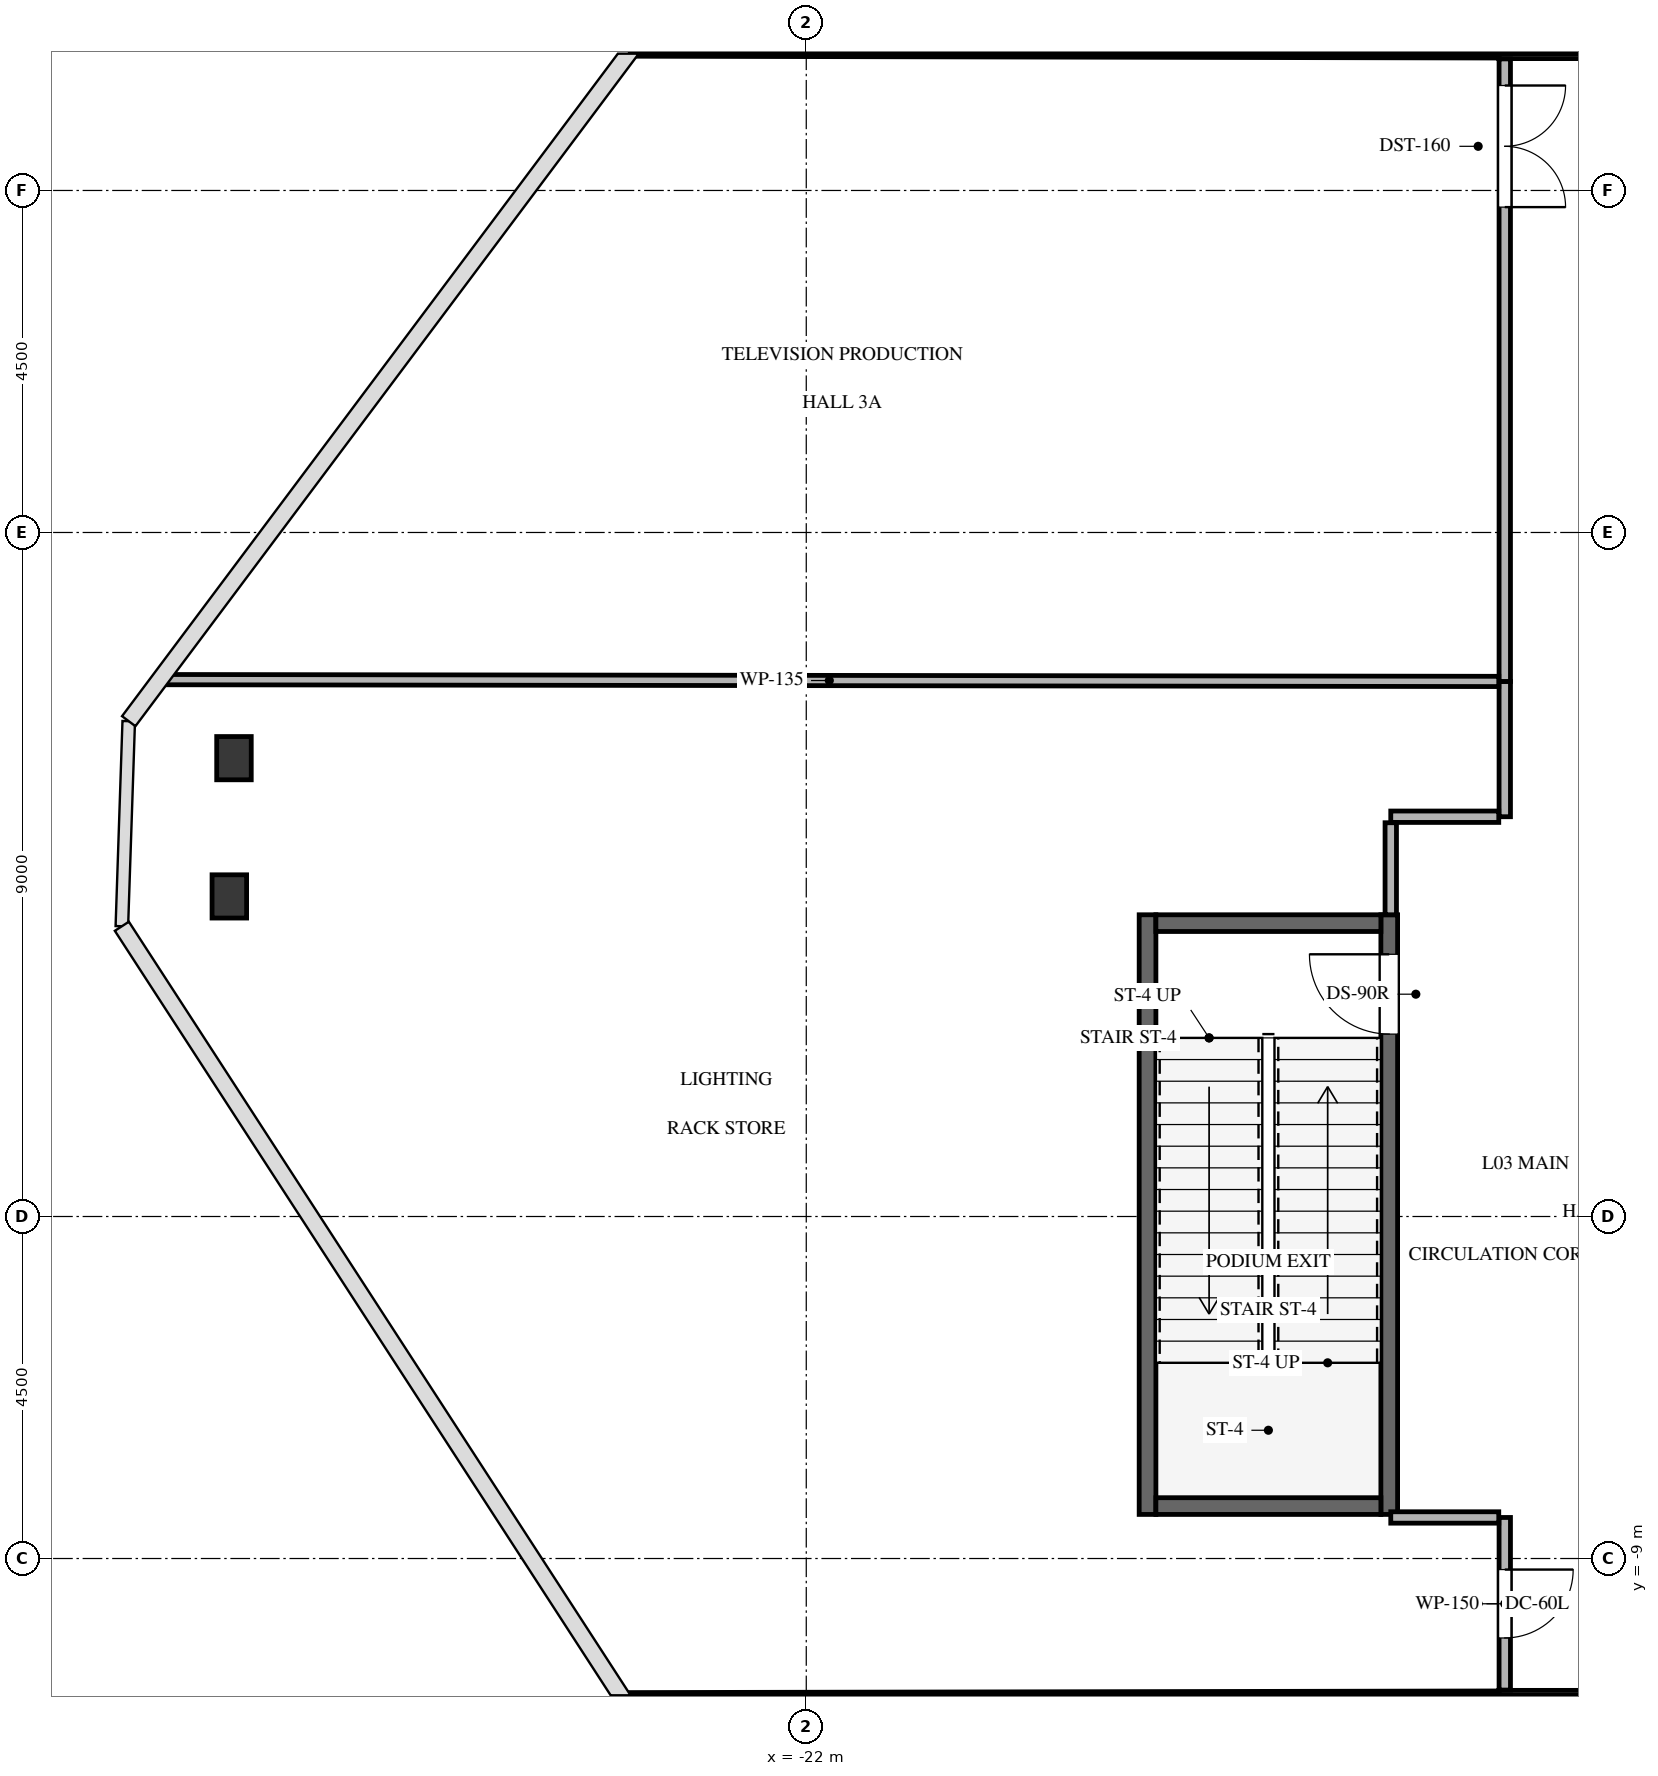
"""IFC4 building model, lengths in metres.
Left out: names, types, materials, properties, quantities, classifications, styles, units other than length and angle.
Written with IfcOpenShell. Run it as: python <this file> out.ifc"""

import sys

from ifc_helpers import new_model, si_unit, direction, frame, frame_2d, origin, origin_2d, place, context, subcontext, project, spatial, rectangle, i_section, extrude, source, transform, mapped, element, fill, save


model = new_model("IFC4")
c1 = context("Model", 3, precision=1e-05, world=origin(), true_north=direction((0.0, 1.0)))
c2 = subcontext(c1, "Body", "Model", "MODEL_VIEW")
j1 = project(units=[si_unit("LENGTHUNIT", "METRE"), si_unit("PLANEANGLEUNIT", "RADIAN")], contexts=[c1])
p1 = place(None, origin())
s1 = spatial("IfcSite", under=j1, at=p1, CompositionType="ELEMENT")
p2 = place(p1, origin())
s2 = spatial("IfcBuilding", under=s1, at=p2, CompositionType="ELEMENT")
p3 = place(p2, frame((0.0, 0.0, 15.6)))
s3 = spatial("IfcBuildingStorey", under=s2, at=p3, CompositionType="ELEMENT", Elevation=15.6)
p4 = place(p3, frame((-14.33, -8.42, -0.32), z_axis=(0.0, 0.0, 1.0), x_axis=(0.0, 1.0, 0.0)))
e1 = element("IfcWall", 1, at=p4, inside=s3, PredefinedType="SHEAR", context=c2, shape_type="SweptSolid", body=[
    extrude(rectangle(XDim=7.89, YDim=0.22, at=frame_2d((3.945, 0.0))), origin(), (0.0, 0.0, 1.0), 5.6),
])
p5 = place(p4, frame((6.32, 0.0, 0.0)))
e2 = element("IfcOpeningElement", 2, at=p5, cuts=e1, PredefinedType="OPENING", context=c2, shape_type="SweptSolid", body=[
    extrude(rectangle(XDim=1.05, YDim=2.15, at=frame_2d((0.525, 1.075))), frame((0.0, 0.12, 0.0), z_axis=(0.0, -1.0, 0.0), x_axis=(1.0, 0.0, 0.0)), (0.0, 0.0, 1.0), 0.24),
])
p6 = place(p3, frame((-17.51, -0.53, -0.32), z_axis=(0.0, 0.0, 1.0), x_axis=(0.0, -1.0, 0.0)))
e3 = element("IfcWall", 3, at=p6, inside=s3, PredefinedType="SHEAR", context=c2, shape_type="SweptSolid", body=[
    extrude(rectangle(XDim=7.89, YDim=0.22, at=frame_2d((3.945, 0.0))), origin(), (0.0, 0.0, 1.0), 5.6),
])
for number, where, z_axis, x_axis in (
    (4, (-17.4, -8.31, -0.32), (0.0, 0.0, 1.0), (1.0, 0.0, 0.0)),
    (5, (-14.44, -0.64, -0.32), (0.0, 0.0, 1.0), (-1.0, 0.0, 0.0)),
):
    element("IfcWall", number, at=place(p3, frame(where, z_axis=z_axis, x_axis=x_axis)), inside=s3, PredefinedType="SHEAR", context=c2, shape_type="SweptSolid", body=[
        extrude(rectangle(XDim=2.96, YDim=0.22, at=frame_2d((1.48, 0.0))), origin(), (0.0, 0.0, 1.0), 5.6),
    ])
m1 = source(origin(), c2, "Body", "SweptSolid", [
    extrude(i_section(OverallWidth=0.454, OverallDepth=0.569, WebThickness=0.078, FlangeThickness=0.125, FilletRadius=0.031, at=origin_2d()), origin(), (0.0, 0.0, 1.0), 5.6),
])
for number, where, z_axis, x_axis in (
    (6, (-29.591, -0.289, -0.32), (0.0, 0.0, 1.0), (1.0, 0.0, 0.0)),
    (7, (-29.529, 1.531, -0.32), (0.0, 0.0, 1.0), (1.0, 0.0, 0.0)),
):
    element("IfcColumn", number, at=place(p3, frame(where, z_axis=z_axis, x_axis=x_axis)), inside=s3, PredefinedType="COLUMN", context=c2, shape_type="MappedRepresentation", body=[
        mapped(m1, transform((0.0, 0.0, 0.0), x_axis=(1.0, 0.0, 0.0), y_axis=(0.0, 1.0, 0.0), z_axis=(0.0, 0.0, 1.0), scale=1.0)),
    ])
p7 = place(p3, frame((-3.96, 10.81, 0.0), z_axis=(0.0, 0.0, 1.0), x_axis=(-1.0, 0.0, 0.0)))
e8 = element("IfcWall", 8, at=p7, inside=s3, PredefinedType="PARTITIONING", context=c2, shape_type="SweptSolid", body=[
    extrude(rectangle(XDim=8.93, YDim=0.15, at=frame_2d((4.465, 0.0))), origin(), (0.0, 0.0, 1.0), 4.284),
])
p8 = place(p7, frame((0.35, 0.0, 0.0)))
e9 = element("IfcOpeningElement", 9, at=p8, cuts=e8, PredefinedType="OPENING", context=c2, shape_type="SweptSolid", body=[
    extrude(rectangle(XDim=1.6, YDim=2.15, at=frame_2d((0.8, 1.075))), frame((0.0, 0.085, 0.0), z_axis=(0.0, -1.0, 0.0), x_axis=(1.0, 0.0, 0.0)), (0.0, 0.0, 1.0), 0.17),
])
p9 = place(p3, frame((-12.89, -10.81, 0.0), z_axis=(0.0, 0.0, 1.0), x_axis=(1.0, 0.0, 0.0)))
e10 = element("IfcWall", 10, at=p9, inside=s3, PredefinedType="PARTITIONING", context=c2, shape_type="SweptSolid", body=[
    extrude(rectangle(XDim=4.93, YDim=0.15, at=frame_2d((2.465, 0.0))), origin(), (0.0, 0.0, 1.0), 4.284),
])
p10 = place(p9, frame((2.005, 0.0, 0.0)))
e11 = element("IfcOpeningElement", 11, at=p10, cuts=e10, PredefinedType="OPENING", context=c2, shape_type="SweptSolid", body=[
    extrude(rectangle(XDim=0.92, YDim=2.1, at=frame_2d((0.46, 1.05))), frame((0.0, 0.085, 0.0), z_axis=(0.0, -1.0, 0.0), x_axis=(1.0, 0.0, 0.0)), (0.0, 0.0, 1.0), 0.17),
])
p11 = place(p3, frame((-12.81, -8.46, 0.0), z_axis=(0.0, 0.0, 1.0), x_axis=(0.0, -1.0, 0.0)))
e12 = element("IfcWall", 12, at=p11, inside=s3, PredefinedType="PARTITIONING", context=c2, shape_type="SweptSolid", body=[
    extrude(rectangle(XDim=2.271, YDim=0.15, at=frame_2d((1.135, 0.0))), origin(), (0.0, 0.0, 1.0), 5.265),
])
p12 = place(p11, frame((0.686, 0.0, 0.0)))
e13 = element("IfcOpeningElement", 13, at=p12, cuts=e12, PredefinedType="OPENING", context=c2, shape_type="SweptSolid", body=[
    extrude(rectangle(XDim=0.9, YDim=2.05, at=frame_2d((0.45, 1.025))), frame((0.0, 0.085, 0.0), z_axis=(0.0, -1.0, 0.0), x_axis=(1.0, 0.0, 0.0)), (0.0, 0.0, 1.0), 0.17),
])
p13 = place(p3, frame((-12.81, 2.54, 0.0), z_axis=(0.0, 0.0, 1.0), x_axis=(0.0, -1.0, 0.0)))
e14 = element("IfcWall", 14, at=p13, inside=s3, PredefinedType="PARTITIONING", context=c2, shape_type="SweptSolid", body=[
    extrude(rectangle(XDim=1.78, YDim=0.15, at=frame_2d((0.89, 0.0))), origin(), (0.0, 0.0, 1.0), 4.284),
])
for number, where, z_axis, x_axis in (
    (15, (-12.889, 0.76, 0.0), (0.0, 0.0, 1.0), (-1.0, 0.0, 0.0)),
    (16, (-14.31, -8.46, 0.0), (0.0, 0.0, 1.0), (1.0, 0.0, 0.0)),
):
    element("IfcWall", number, at=place(p3, frame(where, z_axis=z_axis, x_axis=x_axis)), inside=s3, PredefinedType="PARTITIONING", context=c2, shape_type="SweptSolid", body=[
        extrude(rectangle(XDim=1.421, YDim=0.15, at=frame_2d((0.71, 0.0))), origin(), (0.0, 0.0, 1.0), 5.265),
    ])
p14 = place(p3, frame((-14.31, 0.681, 0.0), z_axis=(0.0, 0.0, 1.0), x_axis=(0.0, -1.0, 0.0)))
e17 = element("IfcWall", 17, at=p14, inside=s3, PredefinedType="PARTITIONING", context=c2, shape_type="SweptSolid", body=[
    extrude(rectangle(XDim=1.211, YDim=0.15, at=frame_2d((0.605, 0.0))), origin(), (0.0, 0.0, 1.0), 5.265),
])
p15 = place(p3, frame((-12.81, 10.731, 0.0), z_axis=(0.0, 0.0, 1.0), x_axis=(0.0, -1.0, 0.0)))
e18 = element("IfcWall", 18, at=p15, inside=s3, PredefinedType="PARTITIONING", context=c2, shape_type="SweptSolid", body=[
    extrude(rectangle(XDim=8.191, YDim=0.15, at=frame_2d((4.095, 0.0))), origin(), (0.0, 0.0, 1.0), 4.284),
])
p16 = place(p15, frame((0.35, 0.0, 0.0)))
e19 = element("IfcOpeningElement", 19, at=p16, cuts=e18, PredefinedType="OPENING", context=c2, shape_type="SweptSolid", body=[
    extrude(rectangle(XDim=1.6, YDim=2.15, at=frame_2d((0.8, 1.075))), frame((0.0, 0.085, 0.0), z_axis=(0.0, -1.0, 0.0), x_axis=(1.0, 0.0, 0.0)), (0.0, 0.0, 1.0), 0.17),
])
p17 = place(p3, frame((-12.89, 10.81, 0.0), z_axis=(0.0, 0.0, 1.0), x_axis=(-0.999997852069, 0.002072645121, 0.0)))
e20 = element("IfcWall", 20, at=p17, inside=s3, PredefinedType="PARTITIONING", context=c2, shape_type="SweptSolid", body=[
    extrude(rectangle(XDim=11.426, YDim=0.135, at=frame_2d((5.713, 0.0))), origin(), (0.0, 0.0, 1.0), 4.574),
])
p18 = place(p3, frame((-24.422, -10.832, 0.0), z_axis=(0.0, 0.0, 1.0), x_axis=(0.999998264499, 0.001863061508, 0.0)))
e21 = element("IfcWall", 21, at=p18, inside=s3, PredefinedType="PARTITIONING", context=c2, shape_type="SweptSolid", body=[
    extrude(rectangle(XDim=11.532, YDim=0.135, at=frame_2d((5.766, 0.0))), origin(), (0.0, 0.0, 1.0), 4.574),
])
p19 = place(p3, frame((-30.505, 2.564, 0.0), z_axis=(0.0, 0.0, 1.0), x_axis=(0.999999077639, -0.001358204807, 0.0)))
e22 = element("IfcWall", 22, at=p19, inside=s3, PredefinedType="PARTITIONING", context=c2, shape_type="SweptSolid", body=[
    extrude(rectangle(XDim=17.616, YDim=0.135, at=frame_2d((8.808, 0.0))), origin(), (0.0, 0.0, 1.0), 4.097),
])
m2 = source(origin(), c2, "Body", "SweptSolid", [
    extrude(rectangle(XDim=1.05, YDim=2.15, at=frame_2d((0.525, 1.075))), frame((0.0, 0.025, 0.0), z_axis=(0.0, -1.0, 0.0), x_axis=(1.0, 0.0, 0.0)), (0.0, 0.0, 1.0), 0.05),
])
p20 = place(p5, origin())
e23 = element("IfcDoor", 23, at=p20, inside=s3, OperationType="SINGLE_SWING_RIGHT", PredefinedType="DOOR", context=c2, shape_type="MappedRepresentation", body=[
    mapped(m2, transform((0.0, 0.0, 0.0), x_axis=(1.0, 0.0, 0.0), y_axis=(0.0, 1.0, 0.0), z_axis=(0.0, 0.0, 1.0), scale=1.0)),
])
fill(e2, e23)
m3 = source(origin(), c2, "Body", "SweptSolid", [
    extrude(rectangle(XDim=0.9, YDim=2.05, at=frame_2d((0.45, 1.025))), frame((0.0, 0.025, 0.0), z_axis=(0.0, -1.0, 0.0), x_axis=(1.0, 0.0, 0.0)), (0.0, 0.0, 1.0), 0.05),
])
p21 = place(p12, origin())
e24 = element("IfcDoor", 24, at=p21, inside=s3, OperationType="SINGLE_SWING_LEFT", PredefinedType="DOOR", context=c2, shape_type="MappedRepresentation", body=[
    mapped(m3, transform((0.0, 0.0, 0.0), x_axis=(1.0, 0.0, 0.0), y_axis=(0.0, 1.0, 0.0), z_axis=(0.0, 0.0, 1.0), scale=1.0)),
])
fill(e13, e24)
m4 = source(origin(), c2, "Body", "SweptSolid", [
    extrude(rectangle(XDim=1.6, YDim=2.15, at=frame_2d((0.8, 1.075))), frame((0.0, 0.025, 0.0), z_axis=(0.0, -1.0, 0.0), x_axis=(1.0, 0.0, 0.0)), (0.0, 0.0, 1.0), 0.05),
])
p22 = place(p16, origin())
e25 = element("IfcDoor", 25, at=p22, inside=s3, OperationType="DOUBLE_DOOR_SINGLE_SWING", PredefinedType="DOOR", context=c2, shape_type="MappedRepresentation", body=[
    mapped(m4, transform((0.0, 0.0, 0.0), x_axis=(1.0, 0.0, 0.0), y_axis=(0.0, 1.0, 0.0), z_axis=(0.0, 0.0, 1.0), scale=1.0)),
])
fill(e19, e25)
save(model, sys.argv[1])
